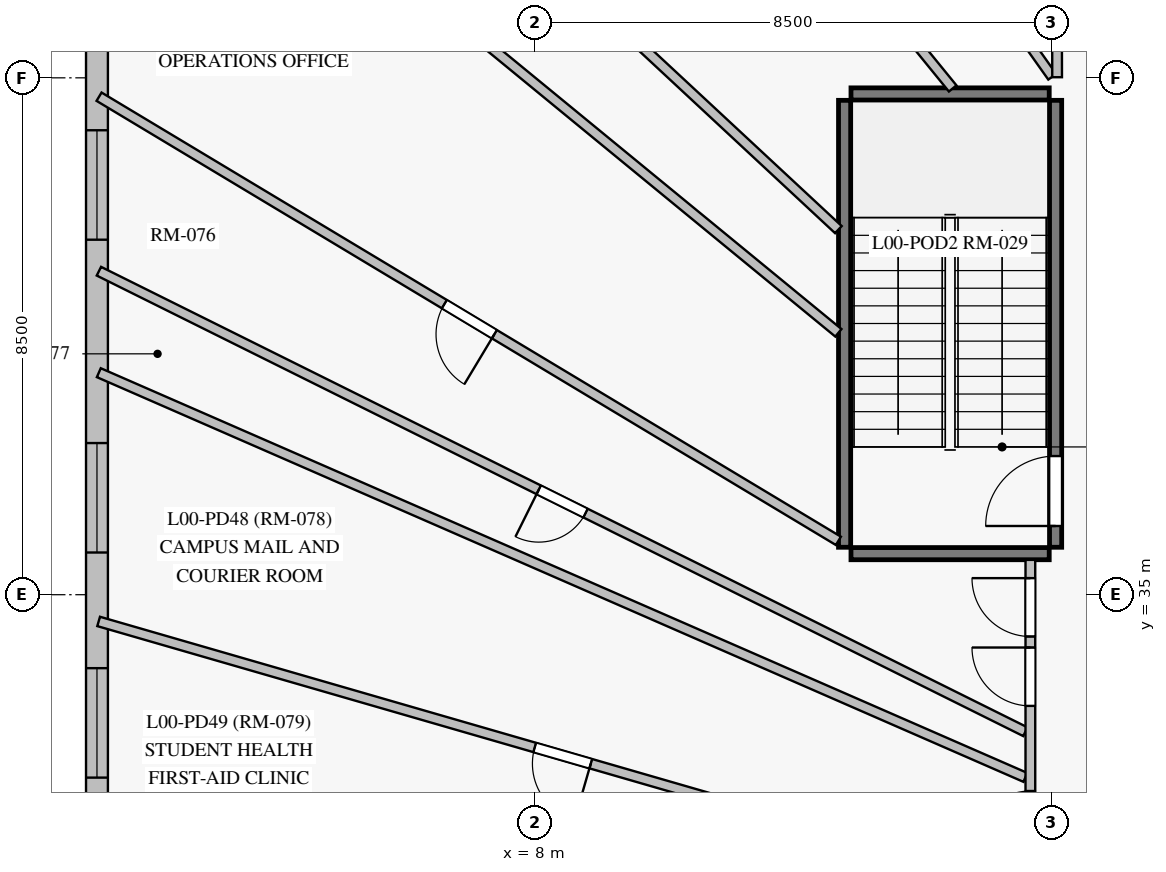
"""IFC4 building model, lengths in metres.
Left out: names, types, materials, properties, quantities, classifications, styles, units other than length and angle.
Written with IfcOpenShell. Run it as: python <this file> out.ifc"""

import sys

from ifc_helpers import new_model, si_unit, direction, frame, frame_2d, origin, origin_with_axes, place, context, subcontext, project, spatial, rectangle, extrude, source, transform, mapped, element, fill, save


model = new_model("IFC4")
c1 = context("Model", 3, precision=1e-05, world=origin(), true_north=direction((0.0, 1.0)))
c2 = subcontext(c1, "Body", "Model", "MODEL_VIEW")
j1 = project(units=[si_unit("LENGTHUNIT", "METRE"), si_unit("PLANEANGLEUNIT", "RADIAN")], contexts=[c1])
p1 = place(None, origin())
s1 = spatial("IfcSite", under=j1, at=p1, CompositionType="ELEMENT")
p2 = place(p1, origin())
s2 = spatial("IfcBuilding", under=s1, at=p2, CompositionType="ELEMENT")
p3 = place(p2, origin())
s3 = spatial("IfcBuildingStorey", under=s2, at=p3, CompositionType="ELEMENT", Elevation=0.0)
p4 = place(p3, frame((0.8, 2.5, 0.0), z_axis=(0.0, 0.0, 1.0), x_axis=(0.0, 1.0, 0.0)))
e1 = element("IfcWall", 1, at=p4, inside=s3, PredefinedType="SOLIDWALL", context=c2, shape_type="SweptSolid", body=[
    extrude(rectangle(XDim=48.0, YDim=0.36, at=frame_2d((24.0, 0.0))), origin(), (0.0, 0.0, 1.0), 4.2),
])
p5 = place(p4, frame((42.816, 0.0, 0.85)))
e2 = element("IfcOpeningElement", 2, at=p5, cuts=e1, PredefinedType="OPENING", context=c2, shape_type="SweptSolid", body=[
    extrude(rectangle(XDim=1.8, YDim=2.2, at=frame_2d((0.9, 1.1))), frame((0.0, 0.19, 0.0), z_axis=(0.0, -1.0, 0.0), x_axis=(1.0, 0.0, 0.0)), (0.0, 0.0, 1.0), 0.38),
])
p6 = place(p4, frame((38.338, 0.0, 0.85)))
e3 = element("IfcOpeningElement", 3, at=p6, cuts=e1, PredefinedType="OPENING", context=c2, shape_type="SweptSolid", body=[
    extrude(rectangle(XDim=1.8, YDim=2.2, at=frame_2d((0.9, 1.1))), frame((0.0, 0.19, 0.0), z_axis=(0.0, -1.0, 0.0), x_axis=(1.0, 0.0, 0.0)), (0.0, 0.0, 1.0), 0.38),
])
p7 = place(p4, frame((33.194, 0.0, 0.85)))
e4 = element("IfcOpeningElement", 4, at=p7, cuts=e1, PredefinedType="OPENING", context=c2, shape_type="SweptSolid", body=[
    extrude(rectangle(XDim=1.8, YDim=2.2, at=frame_2d((0.9, 1.1))), frame((0.0, 0.19, 0.0), z_axis=(0.0, -1.0, 0.0), x_axis=(1.0, 0.0, 0.0)), (0.0, 0.0, 1.0), 0.38),
])
p8 = place(p4, frame((29.492, 0.0, 0.85)))
e5 = element("IfcOpeningElement", 5, at=p8, cuts=e1, PredefinedType="OPENING", context=c2, shape_type="SweptSolid", body=[
    extrude(rectangle(XDim=1.8, YDim=2.2, at=frame_2d((0.9, 1.1))), frame((0.0, 0.19, 0.0), z_axis=(0.0, -1.0, 0.0), x_axis=(1.0, 0.0, 0.0)), (0.0, 0.0, 1.0), 0.38),
])
p9 = place(p4, frame((24.971, 0.0, 0.85)))
e6 = element("IfcOpeningElement", 6, at=p9, cuts=e1, PredefinedType="OPENING", context=c2, shape_type="SweptSolid", body=[
    extrude(rectangle(XDim=1.8, YDim=2.2, at=frame_2d((0.9, 1.1))), frame((0.0, 0.19, 0.0), z_axis=(0.0, -1.0, 0.0), x_axis=(1.0, 0.0, 0.0)), (0.0, 0.0, 1.0), 0.38),
])
p10 = place(p4, frame((12.315, 0.0, 0.85)))
e7 = element("IfcOpeningElement", 7, at=p10, cuts=e1, PredefinedType="OPENING", context=c2, shape_type="SweptSolid", body=[
    extrude(rectangle(XDim=1.8, YDim=2.2, at=frame_2d((0.9, 1.1))), frame((0.0, 0.19, 0.0), z_axis=(0.0, -1.0, 0.0), x_axis=(1.0, 0.0, 0.0)), (0.0, 0.0, 1.0), 0.38),
])
p11 = place(p4, frame((6.841, 0.0, 0.85)))
e8 = element("IfcOpeningElement", 8, at=p11, cuts=e1, PredefinedType="OPENING", context=c2, shape_type="SweptSolid", body=[
    extrude(rectangle(XDim=1.8, YDim=2.2, at=frame_2d((0.9, 1.1))), frame((0.0, 0.19, 0.0), z_axis=(0.0, -1.0, 0.0), x_axis=(1.0, 0.0, 0.0)), (0.0, 0.0, 1.0), 0.38),
])
p12 = place(p4, frame((3.189, 0.0, 0.85)))
e9 = element("IfcOpeningElement", 9, at=p12, cuts=e1, PredefinedType="OPENING", context=c2, shape_type="SweptSolid", body=[
    extrude(rectangle(XDim=1.8, YDim=2.2, at=frame_2d((0.9, 1.1))), frame((0.0, 0.19, 0.0), z_axis=(0.0, -1.0, 0.0), x_axis=(1.0, 0.0, 0.0)), (0.0, 0.0, 1.0), 0.38),
])
p13 = place(p4, frame((17.2, 0.0, 0.0)))
e10 = element("IfcOpeningElement", 10, at=p13, cuts=e1, PredefinedType="OPENING", context=c2, shape_type="SweptSolid", body=[
    extrude(rectangle(XDim=1.8, YDim=2.3, at=frame_2d((0.9, 1.15))), frame((0.0, 0.19, 0.0), z_axis=(0.0, -1.0, 0.0), x_axis=(1.0, 0.0, 0.0)), (0.0, 0.0, 1.0), 0.38),
])
p14 = place(p3, frame((13.095, 35.78, 0.0), z_axis=(0.0, 0.0, 1.0), x_axis=(0.0, 1.0, 0.0)))
e11 = element("IfcWall", 11, at=p14, inside=s3, PredefinedType="SHEAR", context=c2, shape_type="SweptSolid", body=[
    extrude(rectangle(XDim=7.35, YDim=0.2, at=frame_2d((3.675, 0.0))), origin(), (0.0, 0.0, 1.0), 4.2),
])
p15 = place(p3, frame((16.565, 35.78, 0.0), z_axis=(0.0, 0.0, 1.0), x_axis=(0.0, 1.0, 0.0)))
e12 = element("IfcWall", 12, at=p15, inside=s3, PredefinedType="SHEAR", context=c2, shape_type="SweptSolid", body=[
    extrude(rectangle(XDim=7.35, YDim=0.2, at=frame_2d((3.675, 0.0))), origin(), (0.0, 0.0, 1.0), 4.2),
])
p16 = place(p15, frame((0.35, 0.0, 0.0)))
e13 = element("IfcOpeningElement", 13, at=p16, cuts=e12, PredefinedType="OPENING", context=c2, shape_type="SweptSolid", body=[
    extrude(rectangle(XDim=1.15, YDim=2.15, at=frame_2d((0.575, 1.075))), frame((0.0, 0.11, 0.0), z_axis=(0.0, -1.0, 0.0), x_axis=(1.0, 0.0, 0.0)), (0.0, 0.0, 1.0), 0.22),
])
for number, where, z_axis, x_axis in (
    (14, (13.2, 35.675, 0.0), (0.0, 0.0, 1.0), (1.0, 0.0, 0.0)),
    (15, (13.2, 43.235, 0.0), (0.0, 0.0, 1.0), (1.0, 0.0, 0.0)),
):
    element("IfcWall", number, at=place(p3, frame(where, z_axis=z_axis, x_axis=x_axis)), inside=s3, PredefinedType="SHEAR", context=c2, shape_type="SweptSolid", body=[
        extrude(rectangle(XDim=3.26, YDim=0.2, at=frame_2d((1.63, 0.0))), origin(), (0.0, 0.0, 1.0), 4.2),
    ])
p17 = place(p3, frame((16.068, 32.747, 0.0), z_axis=(0.0, 0.0, 1.0), x_axis=(-0.895480769827, 0.44510020318, 0.0)))
e16 = element("IfcWall", 16, at=p17, inside=s3, PredefinedType="PARTITIONING", context=c2, shape_type="SweptSolid", body=[
    extrude(rectangle(XDim=17.015, YDim=0.16, at=frame_2d((8.507, 0.0))), origin(), (0.0, 0.0, 1.0), 4.2),
])
p18 = place(p17, frame((8.077, 0.0, 0.0)))
e17 = element("IfcOpeningElement", 17, at=p18, cuts=e16, PredefinedType="OPENING", context=c2, shape_type="SweptSolid", body=[
    extrude(rectangle(XDim=0.86, YDim=2.04, at=frame_2d((0.43, 1.02))), frame((0.0, 0.09, 0.0), z_axis=(0.0, -1.0, 0.0), x_axis=(1.0, 0.0, 0.0)), (0.0, 0.0, 1.0), 0.18),
])
p19 = place(p3, frame((16.068, 31.996, 0.0), z_axis=(0.0, 0.0, 1.0), x_axis=(-0.916400464202, 0.400262650281, 0.0)))
e18 = element("IfcWall", 18, at=p19, inside=s3, PredefinedType="PARTITIONING", context=c2, shape_type="SweptSolid", body=[
    extrude(rectangle(XDim=16.628, YDim=0.16, at=frame_2d((8.314, 0.0))), origin(), (0.0, 0.0, 1.0), 4.2),
])
p20 = place(p3, frame((16.068, 30.156, 0.0), z_axis=(0.0, 0.0, 1.0), x_axis=(-0.960680893107, 0.277654860608, 0.0)))
e19 = element("IfcWall", 19, at=p20, inside=s3, PredefinedType="PARTITIONING", context=c2, shape_type="SweptSolid", body=[
    extrude(rectangle(XDim=15.864, YDim=0.16, at=frame_2d((7.932, 0.0))), origin(), (0.0, 0.0, 1.0), 4.2),
])
p21 = place(p20, frame((7.44, 0.0, 0.0)))
e20 = element("IfcOpeningElement", 20, at=p21, cuts=e19, PredefinedType="OPENING", context=c2, shape_type="SweptSolid", body=[
    extrude(rectangle(XDim=0.96, YDim=2.15, at=frame_2d((0.48, 1.075))), frame((0.0, 0.09, 0.0), z_axis=(0.0, -1.0, 0.0), x_axis=(1.0, 0.0, 0.0)), (0.0, 0.0, 1.0), 0.18),
])
p22 = place(p3, frame((12.993, 39.307, 0.0), z_axis=(0.0, 0.0, 1.0), x_axis=(-0.772944890545, 0.634473164272, 0.0)))
e21 = element("IfcWall", 21, at=p22, inside=s3, PredefinedType="PARTITIONING", context=c2, shape_type="SweptSolid", body=[
    extrude(rectangle(XDim=15.723, YDim=0.16, at=frame_2d((7.862, 0.0))), origin(), (0.0, 0.0, 1.0), 4.2),
])
p23 = place(p3, frame((12.993, 41.004, 0.0), z_axis=(0.0, 0.0, 1.0), x_axis=(-0.732268799171, 0.681015716236, 0.0)))
e22 = element("IfcWall", 22, at=p23, inside=s3, PredefinedType="PARTITIONING", context=c2, shape_type="SweptSolid", body=[
    extrude(rectangle(XDim=14.905, YDim=0.16, at=frame_2d((7.452, 0.0))), origin(), (0.0, 0.0, 1.0), 4.2),
])
p24 = place(p23, frame((6.96, 0.0, 0.0)))
e23 = element("IfcOpeningElement", 23, at=p24, cuts=e22, PredefinedType="OPENING", context=c2, shape_type="SweptSolid", body=[
    extrude(rectangle(XDim=0.96, YDim=2.15, at=frame_2d((0.48, 1.075))), frame((0.0, 0.09, 0.0), z_axis=(0.0, -1.0, 0.0), x_axis=(1.0, 0.0, 0.0)), (0.0, 0.0, 1.0), 0.18),
])
p25 = place(p3, frame((12.993, 35.885, 0.0), z_axis=(0.0, 0.0, 1.0), x_axis=(-0.857213350392, 0.514961427594, 0.0)))
e24 = element("IfcWall", 24, at=p25, inside=s3, PredefinedType="PARTITIONING", context=c2, shape_type="SweptSolid", body=[
    extrude(rectangle(XDim=14.184, YDim=0.16, at=frame_2d((7.092, 0.0))), origin(), (0.0, 0.0, 1.0), 4.2),
])
p26 = place(p25, frame((6.6, 0.0, 0.0)))
e25 = element("IfcOpeningElement", 25, at=p26, cuts=e24, PredefinedType="OPENING", context=c2, shape_type="SweptSolid", body=[
    extrude(rectangle(XDim=0.96, YDim=2.15, at=frame_2d((0.48, 1.075))), frame((0.0, 0.09, 0.0), z_axis=(0.0, -1.0, 0.0), x_axis=(1.0, 0.0, 0.0)), (0.0, 0.0, 1.0), 0.18),
])
p27 = place(p3, frame((14.872, 43.325, 0.0), z_axis=(0.0, 0.0, 1.0), x_axis=(-0.63154172537, 0.775341891759, 0.0)))
e26 = element("IfcWall", 26, at=p27, inside=s3, PredefinedType="PARTITIONING", context=c2, shape_type="SweptSolid", body=[
    extrude(rectangle(XDim=10.105, YDim=0.16, at=frame_2d((5.053, 0.0))), origin(), (0.0, 0.0, 1.0), 4.2),
])
p28 = place(p27, frame((4.552, 0.0, 0.0)))
e27 = element("IfcOpeningElement", 27, at=p28, cuts=e26, PredefinedType="OPENING", context=c2, shape_type="SweptSolid", body=[
    extrude(rectangle(XDim=0.96, YDim=2.15, at=frame_2d((0.48, 1.075))), frame((0.0, 0.09, 0.0), z_axis=(0.0, -1.0, 0.0), x_axis=(1.0, 0.0, 0.0)), (0.0, 0.0, 1.0), 0.18),
])
p29 = place(p3, frame((16.51, 43.518, 0.0), z_axis=(0.0, 0.0, 1.0), x_axis=(-0.578309317505, 0.815817585792, 0.0)))
e28 = element("IfcWall", 28, at=p29, inside=s3, PredefinedType="PARTITIONING", context=c2, shape_type="SweptSolid", body=[
    extrude(rectangle(XDim=9.372, YDim=0.16, at=frame_2d((4.686, 0.0))), origin(), (0.0, 0.0, 1.0), 4.2),
])
p30 = place(p29, frame((4.193, 0.0, 0.0)))
e29 = element("IfcOpeningElement", 29, at=p30, cuts=e28, PredefinedType="OPENING", context=c2, shape_type="SweptSolid", body=[
    extrude(rectangle(XDim=0.96, YDim=2.15, at=frame_2d((0.48, 1.075))), frame((0.0, 0.09, 0.0), z_axis=(0.0, -1.0, 0.0), x_axis=(1.0, 0.0, 0.0)), (0.0, 0.0, 1.0), 0.18),
])
p31 = place(p3, frame((16.59, 43.51, 0.0), z_axis=(0.0, 0.0, 1.0), x_axis=(-0.001297773224, 0.999999157892, 0.0)))
e30 = element("IfcWall", 30, at=p31, inside=s3, PredefinedType="PARTITIONING", context=c2, shape_type="SweptSolid", body=[
    extrude(rectangle(XDim=7.525, YDim=0.16, at=frame_2d((3.762, 0.0))), origin(), (0.0, 0.0, 1.0), 4.2),
])
p32 = place(p31, frame((3.25, 0.0, 0.0)))
e31 = element("IfcOpeningElement", 31, at=p32, cuts=e30, PredefinedType="OPENING", context=c2, shape_type="SweptSolid", body=[
    extrude(rectangle(XDim=0.96, YDim=2.15, at=frame_2d((0.48, 1.075))), frame((0.0, 0.09, 0.0), z_axis=(0.0, -1.0, 0.0), x_axis=(1.0, 0.0, 0.0)), (0.0, 0.0, 1.0), 0.18),
])
p33 = place(p3, frame((16.15, 29.712, 0.0), z_axis=(0.0, 0.0, 1.0), x_axis=(0.0, 1.0, 0.0)))
e32 = element("IfcWall", 32, at=p33, inside=s3, PredefinedType="PARTITIONING", context=c2, shape_type="SweptSolid", body=[
    extrude(rectangle(XDim=5.861, YDim=0.16, at=frame_2d((2.93, 0.0))), origin(), (0.0, 0.0, 1.0), 4.2),
])
p34 = place(p33, frame((3.459, 0.0, 0.0)))
e33 = element("IfcOpeningElement", 33, at=p34, cuts=e32, PredefinedType="OPENING", context=c2, shape_type="SweptSolid", body=[
    extrude(rectangle(XDim=0.96, YDim=2.15, at=frame_2d((0.48, 1.075))), frame((0.0, 0.09, 0.0), z_axis=(0.0, -1.0, 0.0), x_axis=(1.0, 0.0, 0.0)), (0.0, 0.0, 1.0), 0.18),
])
p35 = place(p33, frame((1.1, 0.0, 0.0)))
e34 = element("IfcOpeningElement", 34, at=p35, cuts=e32, PredefinedType="OPENING", context=c2, shape_type="SweptSolid", body=[
    extrude(rectangle(XDim=0.96, YDim=2.15, at=frame_2d((0.48, 1.075))), frame((0.0, 0.09, 0.0), z_axis=(0.0, -1.0, 0.0), x_axis=(1.0, 0.0, 0.0)), (0.0, 0.0, 1.0), 0.18),
])
p36 = place(p33, frame((4.601, 0.0, 0.0)))
e35 = element("IfcOpeningElement", 35, at=p36, cuts=e32, PredefinedType="OPENING", context=c2, shape_type="SweptSolid", body=[
    extrude(rectangle(XDim=0.96, YDim=2.15, at=frame_2d((0.48, 1.075))), frame((0.0, 0.09, 0.0), z_axis=(0.0, -1.0, 0.0), x_axis=(1.0, 0.0, 0.0)), (0.0, 0.0, 1.0), 0.18),
])
m1 = source(origin_with_axes(), c2, "Body", "SweptSolid", [
    extrude(rectangle(XDim=1.8, YDim=2.2, at=frame_2d((0.9, 1.1))), frame((0.0, 0.03, 0.0), z_axis=(0.0, -1.0, 0.0), x_axis=(1.0, 0.0, 0.0)), (0.0, 0.0, 1.0), 0.06),
])
p37 = place(p6, origin())
e36 = element("IfcWindow", 36, at=p37, inside=s3, PartitioningType="SINGLE_PANEL", PredefinedType="WINDOW", context=c2, shape_type="MappedRepresentation", body=[
    mapped(m1, transform((0.0, 0.0, 0.0), scale=1.0)),
])
fill(e3, e36)
p38 = place(p7, origin())
e37 = element("IfcWindow", 37, at=p38, inside=s3, PartitioningType="SINGLE_PANEL", PredefinedType="WINDOW", context=c2, shape_type="MappedRepresentation", body=[
    mapped(m1, transform((0.0, 0.0, 0.0), scale=1.0)),
])
fill(e4, e37)
p39 = place(p8, origin())
e38 = element("IfcWindow", 38, at=p39, inside=s3, PartitioningType="SINGLE_PANEL", PredefinedType="WINDOW", context=c2, shape_type="MappedRepresentation", body=[
    mapped(m1, transform((0.0, 0.0, 0.0), scale=1.0)),
])
fill(e5, e38)
m2 = source(origin_with_axes(), c2, "Body", "SweptSolid", [
    extrude(rectangle(XDim=1.15, YDim=2.15, at=frame_2d((0.575, 1.075))), frame((0.0, 0.025, 0.0), z_axis=(0.0, -1.0, 0.0), x_axis=(1.0, 0.0, 0.0)), (0.0, 0.0, 1.0), 0.05),
])
p40 = place(p16, origin())
e39 = element("IfcDoor", 39, at=p40, inside=s3, OperationType="SINGLE_SWING_LEFT", PredefinedType="DOOR", context=c2, shape_type="MappedRepresentation", body=[
    mapped(m2, transform((0.0, 0.0, 0.0), scale=1.0)),
])
fill(e13, e39)
m3 = source(origin_with_axes(), c2, "Body", "SweptSolid", [
    extrude(rectangle(XDim=0.96, YDim=2.15, at=frame_2d((0.48, 1.075))), frame((0.0, 0.025, 0.0), z_axis=(0.0, -1.0, 0.0), x_axis=(1.0, 0.0, 0.0)), (0.0, 0.0, 1.0), 0.05),
])
p41 = place(p26, origin())
e40 = element("IfcDoor", 40, at=p41, inside=s3, OperationType="SINGLE_SWING_LEFT", PredefinedType="DOOR", context=c2, shape_type="MappedRepresentation", body=[
    mapped(m3, transform((0.0, 0.0, 0.0), scale=1.0)),
])
fill(e25, e40)
p42 = place(p34, origin())
e41 = element("IfcDoor", 41, at=p42, inside=s3, OperationType="SINGLE_SWING_RIGHT", PredefinedType="DOOR", context=c2, shape_type="MappedRepresentation", body=[
    mapped(m3, transform((0.0, 0.0, 0.0), scale=1.0)),
])
fill(e33, e41)
p43 = place(p35, origin())
e42 = element("IfcDoor", 42, at=p43, inside=s3, OperationType="SINGLE_SWING_LEFT", PredefinedType="DOOR", context=c2, shape_type="MappedRepresentation", body=[
    mapped(m3, transform((0.0, 0.0, 0.0), scale=1.0)),
])
fill(e34, e42)
p44 = place(p36, origin())
e43 = element("IfcDoor", 43, at=p44, inside=s3, OperationType="SINGLE_SWING_RIGHT", PredefinedType="DOOR", context=c2, shape_type="MappedRepresentation", body=[
    mapped(m3, transform((0.0, 0.0, 0.0), scale=1.0)),
])
fill(e35, e43)
p45 = place(p21, origin())
e44 = element("IfcDoor", 44, at=p45, inside=s3, OperationType="SINGLE_SWING_LEFT", PredefinedType="DOOR", context=c2, shape_type="MappedRepresentation", body=[
    mapped(m3, transform((0.0, 0.0, 0.0), scale=1.0)),
])
fill(e20, e44)
m4 = source(origin_with_axes(), c2, "Body", "SweptSolid", [
    extrude(rectangle(XDim=0.86, YDim=2.04, at=frame_2d((0.43, 1.02))), frame((0.0, 0.025, 0.0), z_axis=(0.0, -1.0, 0.0), x_axis=(1.0, 0.0, 0.0)), (0.0, 0.0, 1.0), 0.05),
])
p46 = place(p18, origin())
e45 = element("IfcDoor", 45, at=p46, inside=s3, OperationType="SINGLE_SWING_RIGHT", PredefinedType="DOOR", context=c2, shape_type="MappedRepresentation", body=[
    mapped(m4, transform((0.0, 0.0, 0.0), scale=1.0)),
])
fill(e17, e45)
save(model, sys.argv[1])
